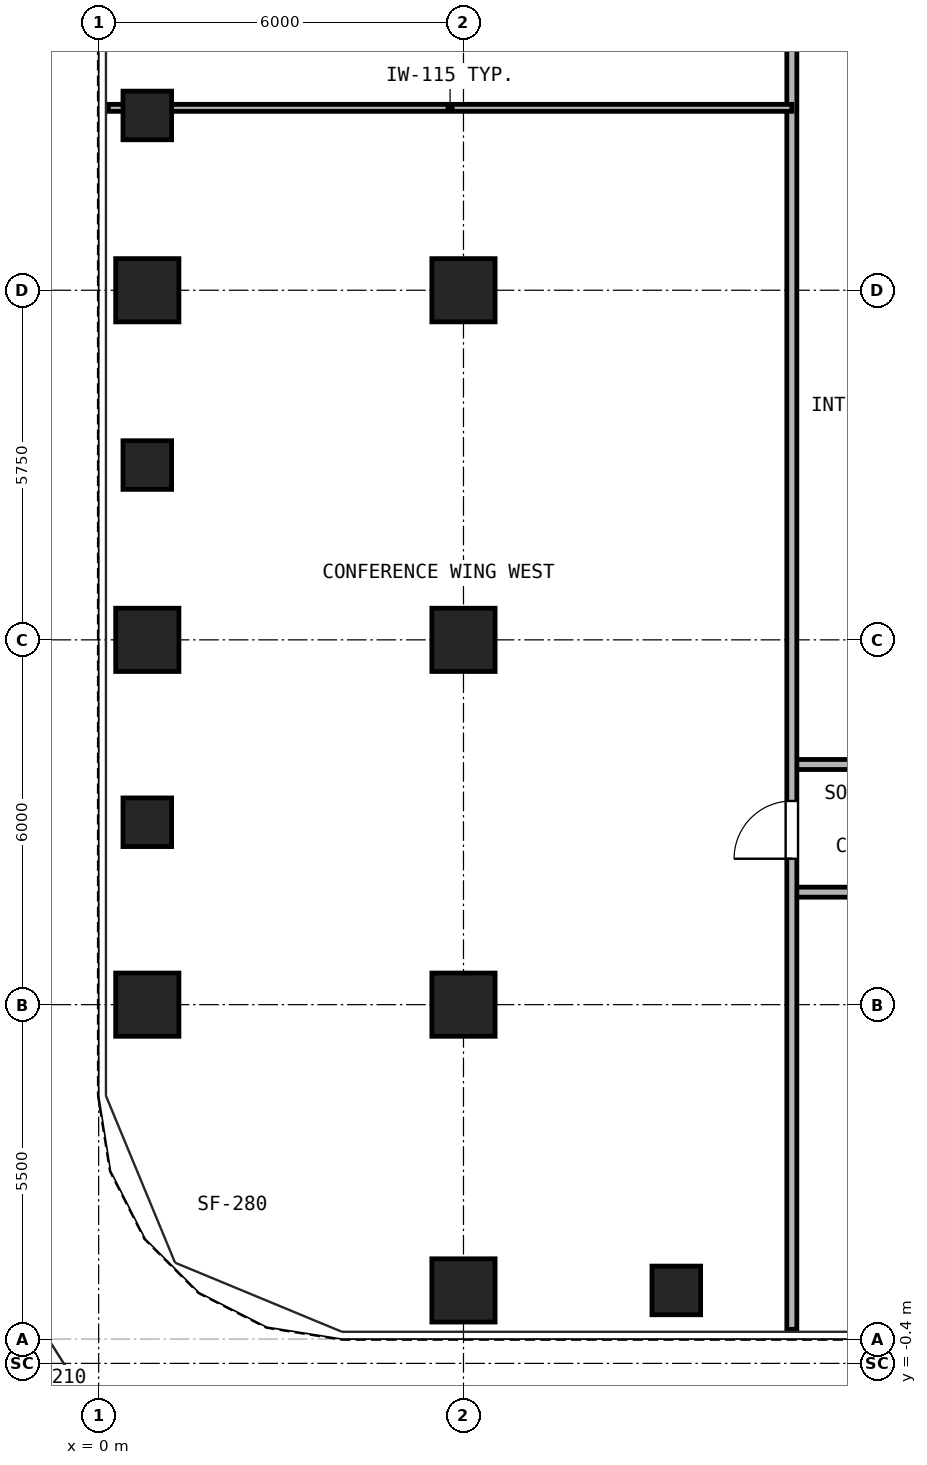
"""IFC4 building model, lengths in metres.
Left out: names, types, materials, properties, quantities, classifications, styles, units other than length and angle.
Written with IfcOpenShell. Run it as: python <this file> out.ifc"""

import sys

from ifc_helpers import new_model, si_unit, direction, frame, frame_2d, origin, origin_2d, place, context, subcontext, project, spatial, rectangle, hollow_rectangle, extrude, source, transform, mapped, element, fill, save


model = new_model("IFC4")
c1 = context("Model", 3, precision=1e-05, world=origin(), true_north=direction((0.0, 1.0)))
c2 = subcontext(c1, "Body", "Model", "MODEL_VIEW")
j1 = project(units=[si_unit("LENGTHUNIT", "METRE"), si_unit("PLANEANGLEUNIT", "RADIAN")], contexts=[c1])
p1 = place(None, origin())
s1 = spatial("IfcSite", under=j1, at=p1, CompositionType="ELEMENT")
p2 = place(p1, origin())
s2 = spatial("IfcBuilding", under=s1, at=p2, CompositionType="ELEMENT")
p3 = place(p2, frame((0.0, 0.0, 29.7)))
s3 = spatial("IfcBuildingStorey", under=s2, at=p3, CompositionType="ELEMENT", Elevation=29.7)
m1 = source(origin(), c2, "Body", "SweptSolid", [
    extrude(hollow_rectangle(XDim=1.04, YDim=1.04, WallThickness=0.065, at=origin_2d()), origin(), (0.0, 0.0, 1.0), 3.32),
])
for number, where, z_axis, x_axis in (
    (1, (6.0, 0.8, 0.0), (0.0, 0.0, 1.0), (1.0, 0.0, 0.0)),
    (2, (0.8, 5.5, 0.0), (0.0, 0.0, 1.0), (1.0, 0.0, 0.0)),
    (3, (0.8, 11.5, 0.0), (0.0, 0.0, 1.0), (1.0, 0.0, 0.0)),
    (4, (0.8, 17.25, 0.0), (0.0, 0.0, 1.0), (1.0, 0.0, 0.0)),
    (5, (6.0, 5.5, 0.0), (0.0, 0.0, 1.0), (1.0, 0.0, 0.0)),
    (6, (6.0, 11.5, 0.0), (0.0, 0.0, 1.0), (1.0, 0.0, 0.0)),
    (7, (6.0, 17.25, 0.0), (0.0, 0.0, 1.0), (1.0, 0.0, 0.0)),
):
    element("IfcColumn", number, at=place(p3, frame(where, z_axis=z_axis, x_axis=x_axis)), inside=s3, PredefinedType="COLUMN", context=c2, shape_type="MappedRepresentation", body=[
        mapped(m1, transform((0.0, 0.0, 0.0), x_axis=(1.0, 0.0, 0.0), y_axis=(0.0, 1.0, 0.0), z_axis=(0.0, 0.0, 1.0), scale=1.0)),
    ])
m2 = source(origin(), c2, "Body", "SweptSolid", [
    extrude(hollow_rectangle(XDim=0.8, YDim=0.8, WallThickness=0.045, at=origin_2d()), origin(), (0.0, 0.0, 1.0), 3.32),
])
for number, where, z_axis, x_axis in (
    (8, (9.5, 0.8, 0.0), (0.0, 0.0, 1.0), (1.0, 0.0, 0.0)),
    (9, (0.8, 8.5, 0.0), (0.0, 0.0, 1.0), (1.0, 0.0, 0.0)),
    (10, (0.8, 14.375, 0.0), (0.0, 0.0, 1.0), (1.0, 0.0, 0.0)),
    (11, (0.8, 20.125, 0.0), (0.0, 0.0, 1.0), (1.0, 0.0, 0.0)),
):
    element("IfcColumn", number, at=place(p3, frame(where, z_axis=z_axis, x_axis=x_axis)), inside=s3, PredefinedType="COLUMN", context=c2, shape_type="MappedRepresentation", body=[
        mapped(m2, transform((0.0, 0.0, 0.0), x_axis=(1.0, 0.0, 0.0), y_axis=(0.0, 1.0, 0.0), z_axis=(0.0, 0.0, 1.0), scale=1.0)),
    ])
p4 = place(p3, frame((11.4, 7.35, 0.0), z_axis=(0.0, 0.0, 1.0), x_axis=(1.0, 0.0, 0.0)))
e12 = element("IfcWall", 12, at=p4, inside=s3, PredefinedType="PARTITIONING", context=c2, shape_type="SweptSolid", body=[
    extrude(rectangle(XDim=24.2, YDim=0.165, at=frame_2d((12.1, 0.0))), origin(), (0.0, 0.0, 1.0), 3.32),
])
p5 = place(p4, frame((3.05, 0.0, 0.0)))
e13 = element("IfcOpeningElement", 13, at=p5, cuts=e12, PredefinedType="OPENING", context=c2, shape_type="SweptSolid", body=[
    extrude(rectangle(XDim=0.95, YDim=2.15, at=frame_2d((0.475, 1.075))), frame((0.0, 0.093, 0.0), z_axis=(0.0, -1.0, 0.0), x_axis=(1.0, 0.0, 0.0)), (0.0, 0.0, 1.0), 0.185),
])
p6 = place(p4, frame((11.6, 0.0, 0.0)))
e14 = element("IfcOpeningElement", 14, at=p6, cuts=e12, PredefinedType="OPENING", context=c2, shape_type="SweptSolid", body=[
    extrude(rectangle(XDim=0.95, YDim=2.15, at=frame_2d((0.475, 1.075))), frame((0.0, 0.093, 0.0), z_axis=(0.0, -1.0, 0.0), x_axis=(1.0, 0.0, 0.0)), (0.0, 0.0, 1.0), 0.185),
])
p7 = place(p4, frame((18.8, 0.0, 0.0)))
e15 = element("IfcOpeningElement", 15, at=p7, cuts=e12, PredefinedType="OPENING", context=c2, shape_type="SweptSolid", body=[
    extrude(rectangle(XDim=0.92, YDim=2.1, at=frame_2d((0.46, 1.05))), frame((0.0, 0.093, 0.0), z_axis=(0.0, -1.0, 0.0), x_axis=(1.0, 0.0, 0.0)), (0.0, 0.0, 1.0), 0.185),
])
p8 = place(p4, frame((22.35, 0.0, 0.0)))
e16 = element("IfcOpeningElement", 16, at=p8, cuts=e12, PredefinedType="OPENING", context=c2, shape_type="SweptSolid", body=[
    extrude(rectangle(XDim=0.92, YDim=2.1, at=frame_2d((0.46, 1.05))), frame((0.0, 0.093, 0.0), z_axis=(0.0, -1.0, 0.0), x_axis=(1.0, 0.0, 0.0)), (0.0, 0.0, 1.0), 0.185),
])
p9 = place(p3, frame((11.4, 9.45, 0.0), z_axis=(0.0, 0.0, 1.0), x_axis=(1.0, 0.0, 0.0)))
e17 = element("IfcWall", 17, at=p9, inside=s3, PredefinedType="PARTITIONING", context=c2, shape_type="SweptSolid", body=[
    extrude(rectangle(XDim=4.9, YDim=0.165, at=frame_2d((2.45, 0.0))), origin(), (0.0, 0.0, 1.0), 3.32),
])
p10 = place(p3, frame((11.4, 0.16, 0.0), z_axis=(0.0, 0.0, 1.0), x_axis=(0.0, 1.0, 0.0)))
e18 = element("IfcWall", 18, at=p10, inside=s3, PredefinedType="PARTITIONING", context=c2, shape_type="SweptSolid", body=[
    extrude(rectangle(XDim=40.18, YDim=0.165, at=frame_2d((20.09, 0.0))), origin(), (0.0, 0.0, 1.0), 3.32),
])
p11 = place(p10, frame((7.74, 0.0, 0.0)))
e19 = element("IfcOpeningElement", 19, at=p11, cuts=e18, PredefinedType="OPENING", context=c2, shape_type="SweptSolid", body=[
    extrude(rectangle(XDim=0.95, YDim=2.15, at=frame_2d((0.475, 1.075))), frame((0.0, 0.093, 0.0), z_axis=(0.0, -1.0, 0.0), x_axis=(1.0, 0.0, 0.0)), (0.0, 0.0, 1.0), 0.185),
])
p12 = place(p10, frame((30.64, 0.0, 0.0)))
e20 = element("IfcOpeningElement", 20, at=p12, cuts=e18, PredefinedType="OPENING", context=c2, shape_type="SweptSolid", body=[
    extrude(rectangle(XDim=0.95, YDim=2.15, at=frame_2d((0.475, 1.075))), frame((0.0, 0.093, 0.0), z_axis=(0.0, -1.0, 0.0), x_axis=(1.0, 0.0, 0.0)), (0.0, 0.0, 1.0), 0.185),
])
p13 = place(p3, frame((0.16, 20.25, 0.0), z_axis=(0.0, 0.0, 1.0), x_axis=(1.0, 0.0, 0.0)))
e21 = element("IfcWall", 21, at=p13, inside=s3, PredefinedType="PARTITIONING", context=c2, shape_type="SweptSolid", body=[
    extrude(rectangle(XDim=11.24, YDim=0.115, at=frame_2d((5.62, 0.0))), origin(), (0.0, 0.0, 1.0), 2.898),
])
p14 = place(p11, frame((0.95, 0.0, 0.0), z_axis=(0.0, 0.0, 1.0), x_axis=(-1.0, 0.0, 0.0)))
e22 = element("IfcDoor", 22, at=p14, inside=s3, OperationType="SINGLE_SWING_LEFT", PredefinedType="DOOR", context=c2, shape_type="SweptSolid", body=[
    extrude(rectangle(XDim=0.95, YDim=2.15, at=frame_2d((0.475, 1.075))), frame((0.0, 0.025, 0.0), z_axis=(0.0, -1.0, 0.0), x_axis=(1.0, 0.0, 0.0)), (0.0, 0.0, 1.0), 0.05),
])
fill(e19, e22)
save(model, sys.argv[1])
